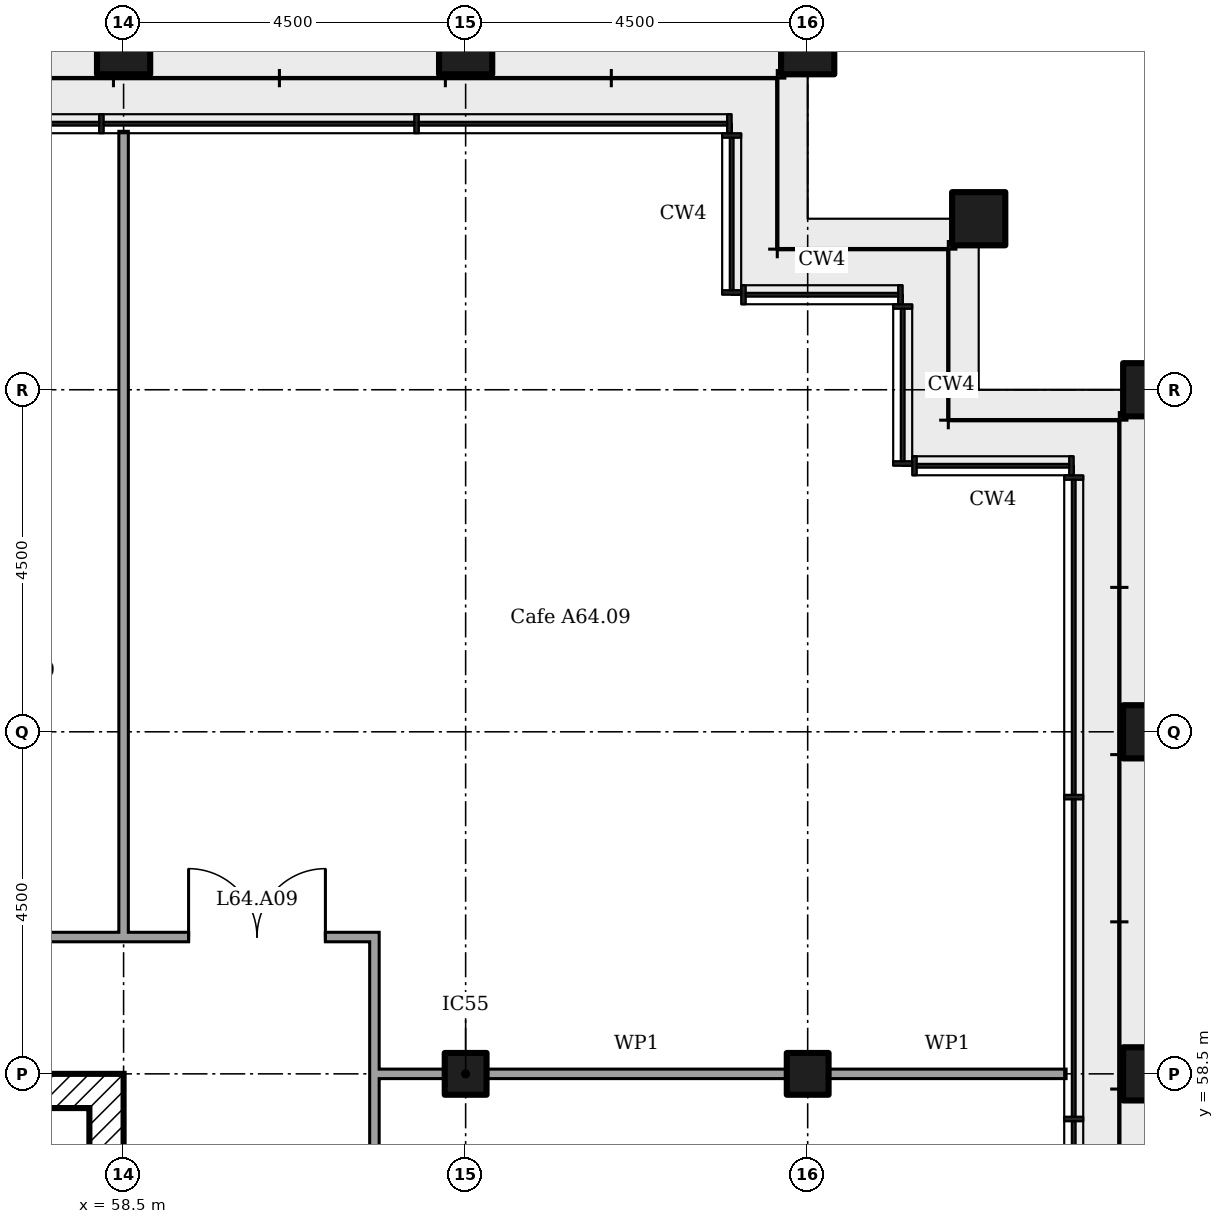
"""IFC4 building model, lengths in metres.
Left out: names, types, materials, properties, quantities, classifications, styles, units other than length and angle.
Written with IfcOpenShell. Run it as: python <this file> out.ifc"""

import sys

from ifc_helpers import new_model, si_unit, direction, frame, frame_2d, origin, origin_2d, place, context, subcontext, project, spatial, rectangle, extrude, element, fill, save


model = new_model("IFC4")
c1 = context("Model", 3, precision=1e-05, world=origin(), true_north=direction((0.0, 1.0)))
c2 = subcontext(c1, "Body", "Model", "MODEL_VIEW")
j1 = project(units=[si_unit("LENGTHUNIT", "METRE"), si_unit("PLANEANGLEUNIT", "RADIAN")], contexts=[c1])
p1 = place(None, origin())
s1 = spatial("IfcSite", under=j1, at=p1, CompositionType="ELEMENT")
p2 = place(p1, origin())
s2 = spatial("IfcBuilding", under=s1, at=p2, CompositionType="ELEMENT")
p3 = place(p2, frame((0.0, 0.0, 251.0)))
s3 = spatial("IfcBuildingStorey", under=s2, at=p3, CompositionType="ELEMENT", Elevation=251.0)
for number, where in (
    (1, (72.0, 58.5, 0.0)),
    (2, (72.0, 63.0, 0.0)),
    (3, (72.0, 67.5, 0.0)),
    (4, (69.75, 69.75, 0.0)),
    (5, (67.5, 72.0, 0.0)),
    (6, (63.0, 72.0, 0.0)),
    (7, (58.5, 72.0, 0.0)),
):
    element("IfcColumn", number, at=place(p3, frame(where)), inside=s3, PredefinedType="COLUMN", context=c2, shape_type="SweptSolid", body=[
        extrude(rectangle(XDim=0.7, YDim=0.7, at=origin_2d()), origin(), (0.0, 0.0, 1.0), 4.2),
    ])
for number, where in (
    (8, (63.0, 58.5, 0.0)),
    (9, (67.5, 58.5, 0.0)),
):
    element("IfcColumn", number, at=place(p3, frame(where)), inside=s3, PredefinedType="COLUMN", context=c2, shape_type="SweptSolid", body=[
        extrude(rectangle(XDim=0.55, YDim=0.55, at=origin_2d()), origin(), (0.0, 0.0, 1.0), 4.2),
    ])
p4 = place(p3, frame((58.275, 40.5, 0.0), z_axis=(0.0, 0.0, 1.0), x_axis=(0.0, 1.0, 0.0)))
e10 = element("IfcWall", 10, at=p4, inside=s3, PredefinedType="SHEAR", context=c2, shape_type="SweptSolid", body=[
    extrude(rectangle(XDim=18.0, YDim=0.45, at=frame_2d((9.0, 0.0))), origin(), (0.0, 0.0, 1.0), 3.78),
])
p5 = place(p4, frame((13.15, 0.0, 0.0)))
e11 = element("IfcOpeningElement", 11, at=p5, cuts=e10, PredefinedType="OPENING", context=c2, shape_type="SweptSolid", body=[
    extrude(rectangle(XDim=1.2, YDim=2.1, at=frame_2d((0.6, 1.05))), frame((0.0, 0.235, 0.0), z_axis=(0.0, -1.0, 0.0), x_axis=(1.0, 0.0, 0.0)), (0.0, 0.0, 1.0), 0.47),
])
p6 = place(p4, frame((3.9, 0.0, 0.0)))
e12 = element("IfcOpeningElement", 12, at=p6, cuts=e10, PredefinedType="OPENING", context=c2, shape_type="SweptSolid", body=[
    extrude(rectangle(XDim=1.8, YDim=2.1, at=frame_2d((0.9, 1.05))), frame((0.0, 0.235, 0.0), z_axis=(0.0, -1.0, 0.0), x_axis=(1.0, 0.0, 0.0)), (0.0, 0.0, 1.0), 0.47),
])
p7 = place(p4, frame((11.525, 0.0, 0.0)))
e13 = element("IfcOpeningElement", 13, at=p7, cuts=e10, PredefinedType="OPENING", context=c2, shape_type="SweptSolid", body=[
    extrude(rectangle(XDim=1.0, YDim=2.1, at=frame_2d((0.5, 1.05))), frame((0.0, 0.235, 0.0), z_axis=(0.0, -1.0, 0.0), x_axis=(1.0, 0.0, 0.0)), (0.0, 0.0, 1.0), 0.47),
])
p8 = place(p3, frame((40.5, 58.275, 0.0)))
e14 = element("IfcWall", 14, at=p8, inside=s3, PredefinedType="SHEAR", context=c2, shape_type="SweptSolid", body=[
    extrude(rectangle(XDim=17.55, YDim=0.45, at=frame_2d((8.775, 0.0))), origin(), (0.0, 0.0, 1.0), 3.78),
])
p9 = place(p3, frame((61.8, 58.5, 0.0)))
e15 = element("IfcWall", 15, at=p9, inside=s3, PredefinedType="PARTITIONING", context=c2, shape_type="SweptSolid", body=[
    extrude(rectangle(XDim=0.925, YDim=0.125, at=frame_2d((0.462, 0.0))), origin(), (0.0, 0.0, 1.0), 3.251),
])
p10 = place(p3, frame((63.275, 58.5, 0.0)))
e16 = element("IfcWall", 16, at=p10, inside=s3, PredefinedType="PARTITIONING", context=c2, shape_type="SweptSolid", body=[
    extrude(rectangle(XDim=3.95, YDim=0.125, at=frame_2d((1.975, 0.0))), origin(), (0.0, 0.0, 1.0), 3.251),
])
p11 = place(p3, frame((67.775, 58.5, 0.0)))
e17 = element("IfcWall", 17, at=p11, inside=s3, PredefinedType="PARTITIONING", context=c2, shape_type="SweptSolid", body=[
    extrude(rectangle(XDim=3.125, YDim=0.125, at=frame_2d((1.562, 0.0))), origin(), (0.0, 0.0, 1.0), 3.251),
])
p12 = place(p3, frame((41.6, 60.3, 0.0)))
e18 = element("IfcWall", 18, at=p12, inside=s3, PredefinedType="PARTITIONING", context=c2, shape_type="SweptSolid", body=[
    extrude(rectangle(XDim=20.262, YDim=0.125, at=frame_2d((10.131, 0.0))), origin(), (0.0, 0.0, 1.0), 4.025),
])
p13 = place(p12, frame((17.755, 0.0, 0.0)))
e19 = element("IfcOpeningElement", 19, at=p13, cuts=e18, PredefinedType="OPENING", context=c2, shape_type="SweptSolid", body=[
    extrude(rectangle(XDim=1.8, YDim=2.1, at=frame_2d((0.9, 1.05))), frame((0.0, 0.073, 0.0), z_axis=(0.0, -1.0, 0.0), x_axis=(1.0, 0.0, 0.0)), (0.0, 0.0, 1.0), 0.145),
])
p14 = place(p12, frame((14.15, 0.0, 0.0)))
e20 = element("IfcOpeningElement", 20, at=p14, cuts=e18, PredefinedType="OPENING", context=c2, shape_type="SweptSolid", body=[
    extrude(rectangle(XDim=1.0, YDim=2.1, at=frame_2d((0.5, 1.05))), frame((0.0, 0.073, 0.0), z_axis=(0.0, -1.0, 0.0), x_axis=(1.0, 0.0, 0.0)), (0.0, 0.0, 1.0), 0.145),
])
p15 = place(p12, frame((9.195, 0.0, 0.0)))
e21 = element("IfcOpeningElement", 21, at=p15, cuts=e18, PredefinedType="OPENING", context=c2, shape_type="SweptSolid", body=[
    extrude(rectangle(XDim=1.0, YDim=2.1, at=frame_2d((0.5, 1.05))), frame((0.0, 0.073, 0.0), z_axis=(0.0, -1.0, 0.0), x_axis=(1.0, 0.0, 0.0)), (0.0, 0.0, 1.0), 0.145),
])
p16 = place(p12, frame((4.5, 0.0, 0.0)))
e22 = element("IfcOpeningElement", 22, at=p16, cuts=e18, PredefinedType="OPENING", context=c2, shape_type="SweptSolid", body=[
    extrude(rectangle(XDim=1.0, YDim=2.1, at=frame_2d((0.5, 1.05))), frame((0.0, 0.073, 0.0), z_axis=(0.0, -1.0, 0.0), x_axis=(1.0, 0.0, 0.0)), (0.0, 0.0, 1.0), 0.145),
])
p17 = place(p3, frame((58.5, 60.3, 0.0), z_axis=(0.0, 0.0, 1.0), x_axis=(0.0, 1.0, 0.0)))
e23 = element("IfcWall", 23, at=p17, inside=s3, PredefinedType="PARTITIONING", context=c2, shape_type="SweptSolid", body=[
    extrude(rectangle(XDim=10.6, YDim=0.125, at=frame_2d((5.3, 0.0))), origin(), (0.0, 0.0, 1.0), 3.341),
])
p18 = place(p3, frame((61.8, 38.163, 0.0), z_axis=(0.0, 0.0, 1.0), x_axis=(0.0, 1.0, 0.0)))
e24 = element("IfcWall", 24, at=p18, inside=s3, PredefinedType="PARTITIONING", context=c2, shape_type="SweptSolid", body=[
    extrude(rectangle(XDim=22.075, YDim=0.125, at=frame_2d((11.038, 0.0))), origin(), (0.0, 0.0, 1.0), 4.025),
])
p19 = place(p18, frame((3.633, 0.0, 0.0)))
e25 = element("IfcOpeningElement", 25, at=p19, cuts=e24, PredefinedType="OPENING", context=c2, shape_type="SweptSolid", body=[
    extrude(rectangle(XDim=1.0, YDim=2.1, at=frame_2d((0.5, 1.05))), frame((0.0, 0.073, 0.0), z_axis=(0.0, -1.0, 0.0), x_axis=(1.0, 0.0, 0.0)), (0.0, 0.0, 1.0), 0.145),
])
p20 = place(p18, frame((9.042, 0.0, 0.0)))
e26 = element("IfcOpeningElement", 26, at=p20, cuts=e24, PredefinedType="OPENING", context=c2, shape_type="SweptSolid", body=[
    extrude(rectangle(XDim=1.0, YDim=2.1, at=frame_2d((0.5, 1.05))), frame((0.0, 0.073, 0.0), z_axis=(0.0, -1.0, 0.0), x_axis=(1.0, 0.0, 0.0)), (0.0, 0.0, 1.0), 0.145),
])
p21 = place(p18, frame((13.087, 0.0, 0.0)))
e27 = element("IfcOpeningElement", 27, at=p21, cuts=e24, PredefinedType="OPENING", context=c2, shape_type="SweptSolid", body=[
    extrude(rectangle(XDim=1.0, YDim=2.1, at=frame_2d((0.5, 1.05))), frame((0.0, 0.073, 0.0), z_axis=(0.0, -1.0, 0.0), x_axis=(1.0, 0.0, 0.0)), (0.0, 0.0, 1.0), 0.145),
])
p22 = place(p18, frame((17.133, 0.0, 0.0)))
e28 = element("IfcOpeningElement", 28, at=p22, cuts=e24, PredefinedType="OPENING", context=c2, shape_type="SweptSolid", body=[
    extrude(rectangle(XDim=1.0, YDim=2.1, at=frame_2d((0.5, 1.05))), frame((0.0, 0.073, 0.0), z_axis=(0.0, -1.0, 0.0), x_axis=(1.0, 0.0, 0.0)), (0.0, 0.0, 1.0), 0.145),
])
p23 = place(p13, origin())
e29 = element("IfcDoor", 29, at=p23, inside=s3, OperationType="DOUBLE_DOOR_SINGLE_SWING", PredefinedType="DOOR", context=c2, shape_type="SweptSolid", body=[
    extrude(rectangle(XDim=1.8, YDim=2.1, at=frame_2d((0.9, 1.05))), frame((0.0, 0.025, 0.0), z_axis=(0.0, -1.0, 0.0), x_axis=(1.0, 0.0, 0.0)), (0.0, 0.0, 1.0), 0.05),
])
fill(e19, e29)
save(model, sys.argv[1])
